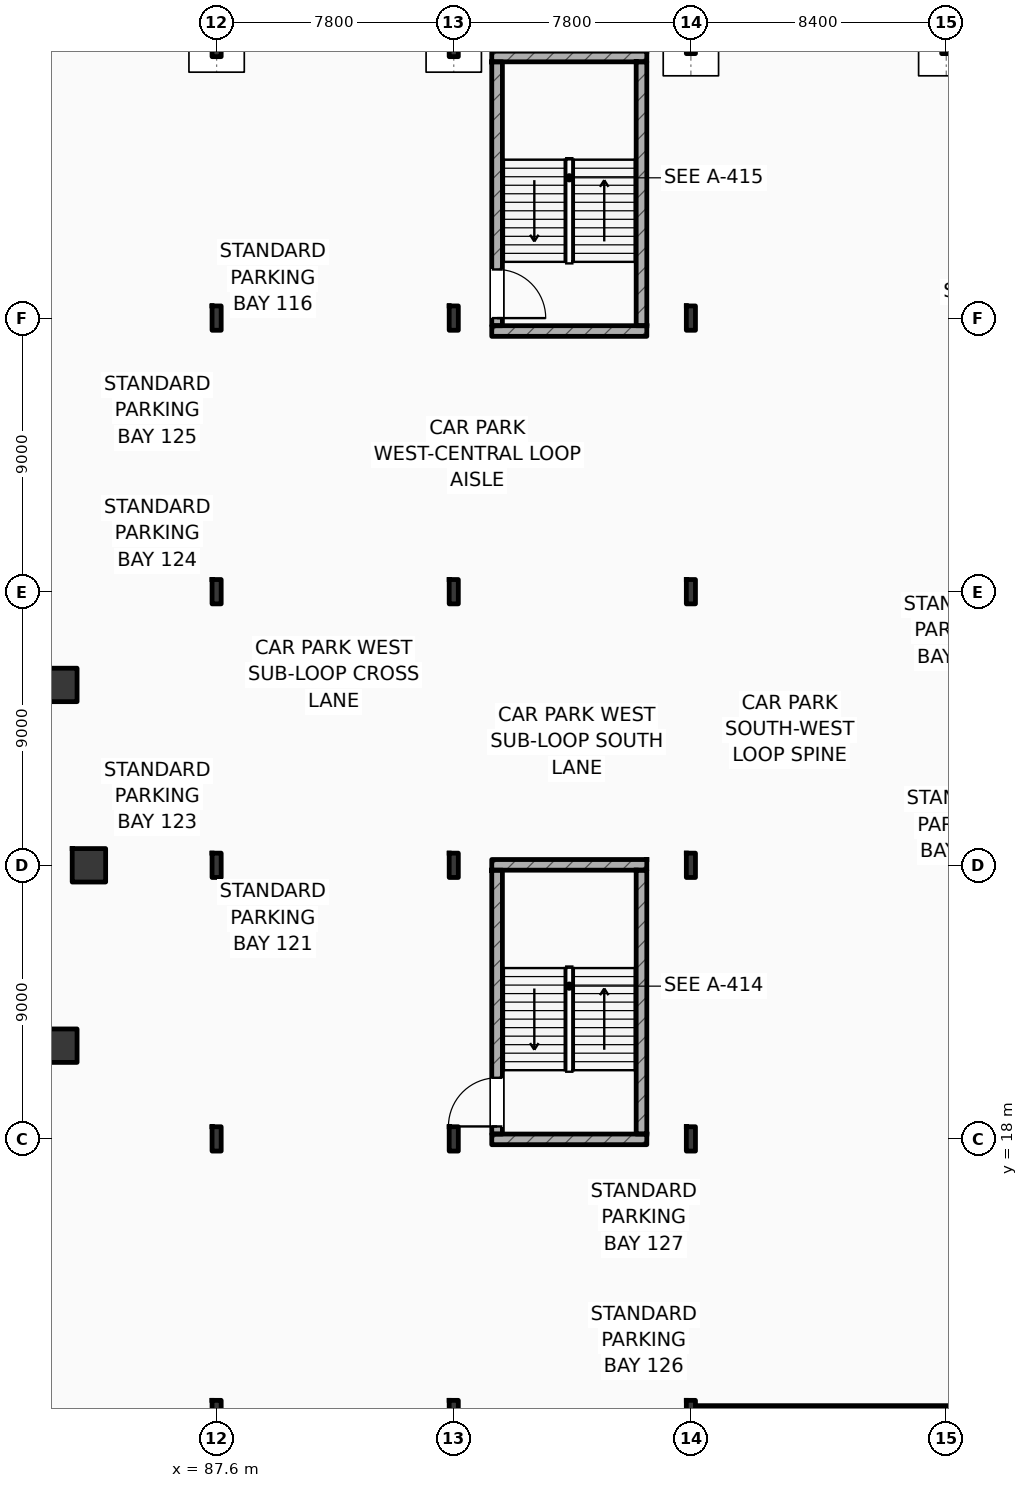
"""IFC4 building model, lengths in metres.
Left out: names, types, materials, properties, quantities, classifications, styles, units other than length and angle.
Written with IfcOpenShell. Run it as: python <this file> out.ifc"""

import sys

from ifc_helpers import new_model, si_unit, direction, frame, frame_2d, origin, origin_2d, place, context, subcontext, project, spatial, rectangle, i_section, extrude, element, fill, save


model = new_model("IFC4")
c1 = context("Model", 3, precision=1e-05, world=origin(), true_north=direction((0.0, 1.0)))
c2 = subcontext(c1, "Body", "Model", "MODEL_VIEW")
j1 = project(units=[si_unit("LENGTHUNIT", "METRE"), si_unit("PLANEANGLEUNIT", "RADIAN")], contexts=[c1])
p1 = place(None, origin())
s1 = spatial("IfcSite", under=j1, at=p1, CompositionType="ELEMENT")
p2 = place(p1, origin())
s2 = spatial("IfcBuilding", under=s1, at=p2, CompositionType="ELEMENT")
p3 = place(p2, frame((0.0, 0.0, -4.5)))
s3 = spatial("IfcBuildingStorey", under=s2, at=p3, CompositionType="ELEMENT", Elevation=-4.5)
p4 = place(p3, frame((103.2, 9.0, 0.0), z_axis=(0.0, 0.0, 1.0), x_axis=(1.0, 0.0, 0.0)))
e1 = element("IfcWall", 1, at=p4, inside=s3, PredefinedType="SOLIDWALL", context=c2, shape_type="SweptSolid", body=[
    extrude(rectangle(XDim=68.8, YDim=0.45, at=frame_2d((34.4, 0.0))), origin(), (0.0, 0.0, 1.0), 4.5),
])
for number, where, z_axis, x_axis in (
    (2, (103.2, 54.0, 0.0), (0.0, 0.0, 1.0), (1.0, 0.0, 0.0)),
    (3, (111.6, 54.0, 0.0), (0.0, 0.0, 1.0), (1.0, 0.0, 0.0)),
):
    element("IfcColumn", number, at=place(p3, frame(where, z_axis=z_axis, x_axis=x_axis)), inside=s3, PredefinedType="COLUMN", context=c2, shape_type="SweptSolid", body=[
        extrude(i_section(OverallWidth=0.3, OverallDepth=0.6, WebThickness=0.015, FlangeThickness=0.03, FilletRadius=0.027, at=origin_2d()), origin(), (0.0, 0.0, 1.0), 4.5),
    ])
for number, where, z_axis, x_axis in (
    (4, (87.6, 9.0, 0.0), (0.0, 0.0, 1.0), (1.0, 0.0, 0.0)),
    (5, (95.4, 9.0, 0.0), (0.0, 0.0, 1.0), (1.0, 0.0, 0.0)),
    (6, (103.2, 9.0, 0.0), (0.0, 0.0, 1.0), (1.0, 0.0, 0.0)),
    (7, (87.6, 18.0, 0.0), (0.0, 0.0, 1.0), (1.0, 0.0, 0.0)),
    (8, (87.6, 27.0, 0.0), (0.0, 0.0, 1.0), (1.0, 0.0, 0.0)),
    (9, (87.6, 36.0, 0.0), (0.0, 0.0, 1.0), (1.0, 0.0, 0.0)),
    (10, (87.6, 45.0, 0.0), (0.0, 0.0, 1.0), (1.0, 0.0, 0.0)),
    (11, (87.6, 54.0, 0.0), (0.0, 0.0, 1.0), (1.0, 0.0, 0.0)),
    (12, (95.4, 18.0, 0.0), (0.0, 0.0, 1.0), (1.0, 0.0, 0.0)),
    (13, (95.4, 27.0, 0.0), (0.0, 0.0, 1.0), (1.0, 0.0, 0.0)),
    (14, (95.4, 36.0, 0.0), (0.0, 0.0, 1.0), (1.0, 0.0, 0.0)),
    (15, (95.4, 45.0, 0.0), (0.0, 0.0, 1.0), (1.0, 0.0, 0.0)),
    (16, (95.4, 54.0, 0.0), (0.0, 0.0, 1.0), (1.0, 0.0, 0.0)),
    (17, (103.2, 18.0, 0.0), (0.0, 0.0, 1.0), (1.0, 0.0, 0.0)),
    (18, (103.2, 27.0, 0.0), (0.0, 0.0, 1.0), (1.0, 0.0, 0.0)),
    (19, (103.2, 36.0, 0.0), (0.0, 0.0, 1.0), (1.0, 0.0, 0.0)),
    (20, (103.2, 45.0, 0.0), (0.0, 0.0, 1.0), (1.0, 0.0, 0.0)),
):
    element("IfcColumn", number, at=place(p3, frame(where, z_axis=z_axis, x_axis=x_axis)), inside=s3, PredefinedType="COLUMN", context=c2, shape_type="SweptSolid", body=[
        extrude(i_section(OverallWidth=0.3, OverallDepth=0.8, WebThickness=0.018, FlangeThickness=0.033, FilletRadius=0.03, at=origin_2d()), origin(), (0.0, 0.0, 1.0), 4.5),
    ])
for number, where, z_axis, x_axis in (
    (21, (83.4, 27.0, 0.0), (0.0, 0.0, 1.0), (1.0, 0.0, 0.0)),
    (22, (82.46, 32.933, 0.0), (0.0, 0.0, 1.0), (1.0, 0.0, 0.0)),
    (23, (82.46, 21.067, 0.0), (0.0, 0.0, 1.0), (1.0, 0.0, 0.0)),
):
    element("IfcColumn", number, at=place(p3, frame(where, z_axis=z_axis, x_axis=x_axis)), inside=s3, PredefinedType="COLUMN", context=c2, shape_type="SweptSolid", body=[
        extrude(rectangle(XDim=1.1, YDim=1.1, at=origin_2d()), origin(), (0.0, 0.0, 1.0), 4.5),
    ])
for number, where, z_axis, x_axis in (
    (24, (96.65, 27.015, 0.0), (0.0, 0.0, 1.0), (1.0, 0.0, 0.0)),
    (25, (96.65, 17.985, 0.0), (0.0, 0.0, 1.0), (1.0, 0.0, 0.0)),
):
    element("IfcWall", number, at=place(p3, frame(where, z_axis=z_axis, x_axis=x_axis)), inside=s3, PredefinedType="SHEAR", context=c2, shape_type="SweptSolid", body=[
        extrude(rectangle(XDim=5.1, YDim=0.35, at=frame_2d((2.55, 0.0))), origin(), (0.0, 0.0, 1.0), 4.5),
    ])
p5 = place(p3, frame((96.825, 18.16, 0.0), z_axis=(0.0, 0.0, 1.0), x_axis=(0.0, 1.0, 0.0)))
e26 = element("IfcWall", 26, at=p5, inside=s3, PredefinedType="SHEAR", context=c2, shape_type="SweptSolid", body=[
    extrude(rectangle(XDim=8.68, YDim=0.35, at=frame_2d((4.34, 0.0))), origin(), (0.0, 0.0, 1.0), 4.5),
])
p6 = place(p5, frame((0.25, 0.0, 0.0)))
e27 = element("IfcOpeningElement", 27, at=p6, cuts=e26, PredefinedType="OPENING", context=c2, shape_type="SweptSolid", body=[
    extrude(rectangle(XDim=1.6, YDim=2.2, at=frame_2d((0.8, 1.1))), frame((0.0, 0.185, 0.0), z_axis=(0.0, -1.0, 0.0), x_axis=(1.0, 0.0, 0.0)), (0.0, 0.0, 1.0), 0.37),
])
p7 = place(p3, frame((101.575, 18.16, 0.0), z_axis=(0.0, 0.0, 1.0), x_axis=(0.0, 1.0, 0.0)))
e28 = element("IfcWall", 28, at=p7, inside=s3, PredefinedType="SHEAR", context=c2, shape_type="SweptSolid", body=[
    extrude(rectangle(XDim=8.68, YDim=0.35, at=frame_2d((4.34, 0.0))), origin(), (0.0, 0.0, 1.0), 4.5),
])
for number, where, z_axis, x_axis in (
    (29, (96.65, 53.605, 0.0), (0.0, 0.0, 1.0), (1.0, 0.0, 0.0)),
    (30, (96.65, 44.575, 0.0), (0.0, 0.0, 1.0), (1.0, 0.0, 0.0)),
):
    element("IfcWall", number, at=place(p3, frame(where, z_axis=z_axis, x_axis=x_axis)), inside=s3, PredefinedType="SHEAR", context=c2, shape_type="SweptSolid", body=[
        extrude(rectangle(XDim=5.1, YDim=0.35, at=frame_2d((2.55, 0.0))), origin(), (0.0, 0.0, 1.0), 4.5),
    ])
p8 = place(p3, frame((96.825, 44.75, 0.0), z_axis=(0.0, 0.0, 1.0), x_axis=(0.0, 1.0, 0.0)))
e31 = element("IfcWall", 31, at=p8, inside=s3, PredefinedType="SHEAR", context=c2, shape_type="SweptSolid", body=[
    extrude(rectangle(XDim=8.68, YDim=0.35, at=frame_2d((4.34, 0.0))), origin(), (0.0, 0.0, 1.0), 4.5),
])
p9 = place(p8, frame((0.25, 0.0, 0.0)))
e32 = element("IfcOpeningElement", 32, at=p9, cuts=e31, PredefinedType="OPENING", context=c2, shape_type="SweptSolid", body=[
    extrude(rectangle(XDim=1.6, YDim=2.2, at=frame_2d((0.8, 1.1))), frame((0.0, 0.185, 0.0), z_axis=(0.0, -1.0, 0.0), x_axis=(1.0, 0.0, 0.0)), (0.0, 0.0, 1.0), 0.37),
])
p10 = place(p3, frame((101.575, 44.75, 0.0), z_axis=(0.0, 0.0, 1.0), x_axis=(0.0, 1.0, 0.0)))
e33 = element("IfcWall", 33, at=p10, inside=s3, PredefinedType="SHEAR", context=c2, shape_type="SweptSolid", body=[
    extrude(rectangle(XDim=8.68, YDim=0.35, at=frame_2d((4.34, 0.0))), origin(), (0.0, 0.0, 1.0), 4.5),
])
p11 = place(p6, origin())
e34 = element("IfcDoor", 34, at=p11, inside=s3, OperationType="SINGLE_SWING_LEFT", PredefinedType="DOOR", context=c2, shape_type="SweptSolid", body=[
    extrude(rectangle(XDim=1.6, YDim=2.2, at=frame_2d((0.8, 1.1))), frame((0.0, 0.025, 0.0), z_axis=(0.0, -1.0, 0.0), x_axis=(1.0, 0.0, 0.0)), (0.0, 0.0, 1.0), 0.05),
])
fill(e27, e34)
p12 = place(p9, frame((1.6, 0.0, 0.0), z_axis=(0.0, 0.0, 1.0), x_axis=(-1.0, 0.0, 0.0)))
e35 = element("IfcDoor", 35, at=p12, inside=s3, OperationType="SINGLE_SWING_LEFT", PredefinedType="DOOR", context=c2, shape_type="SweptSolid", body=[
    extrude(rectangle(XDim=1.6, YDim=2.2, at=frame_2d((0.8, 1.1))), frame((0.0, 0.025, 0.0), z_axis=(0.0, -1.0, 0.0), x_axis=(1.0, 0.0, 0.0)), (0.0, 0.0, 1.0), 0.05),
])
fill(e32, e35)
save(model, sys.argv[1])
